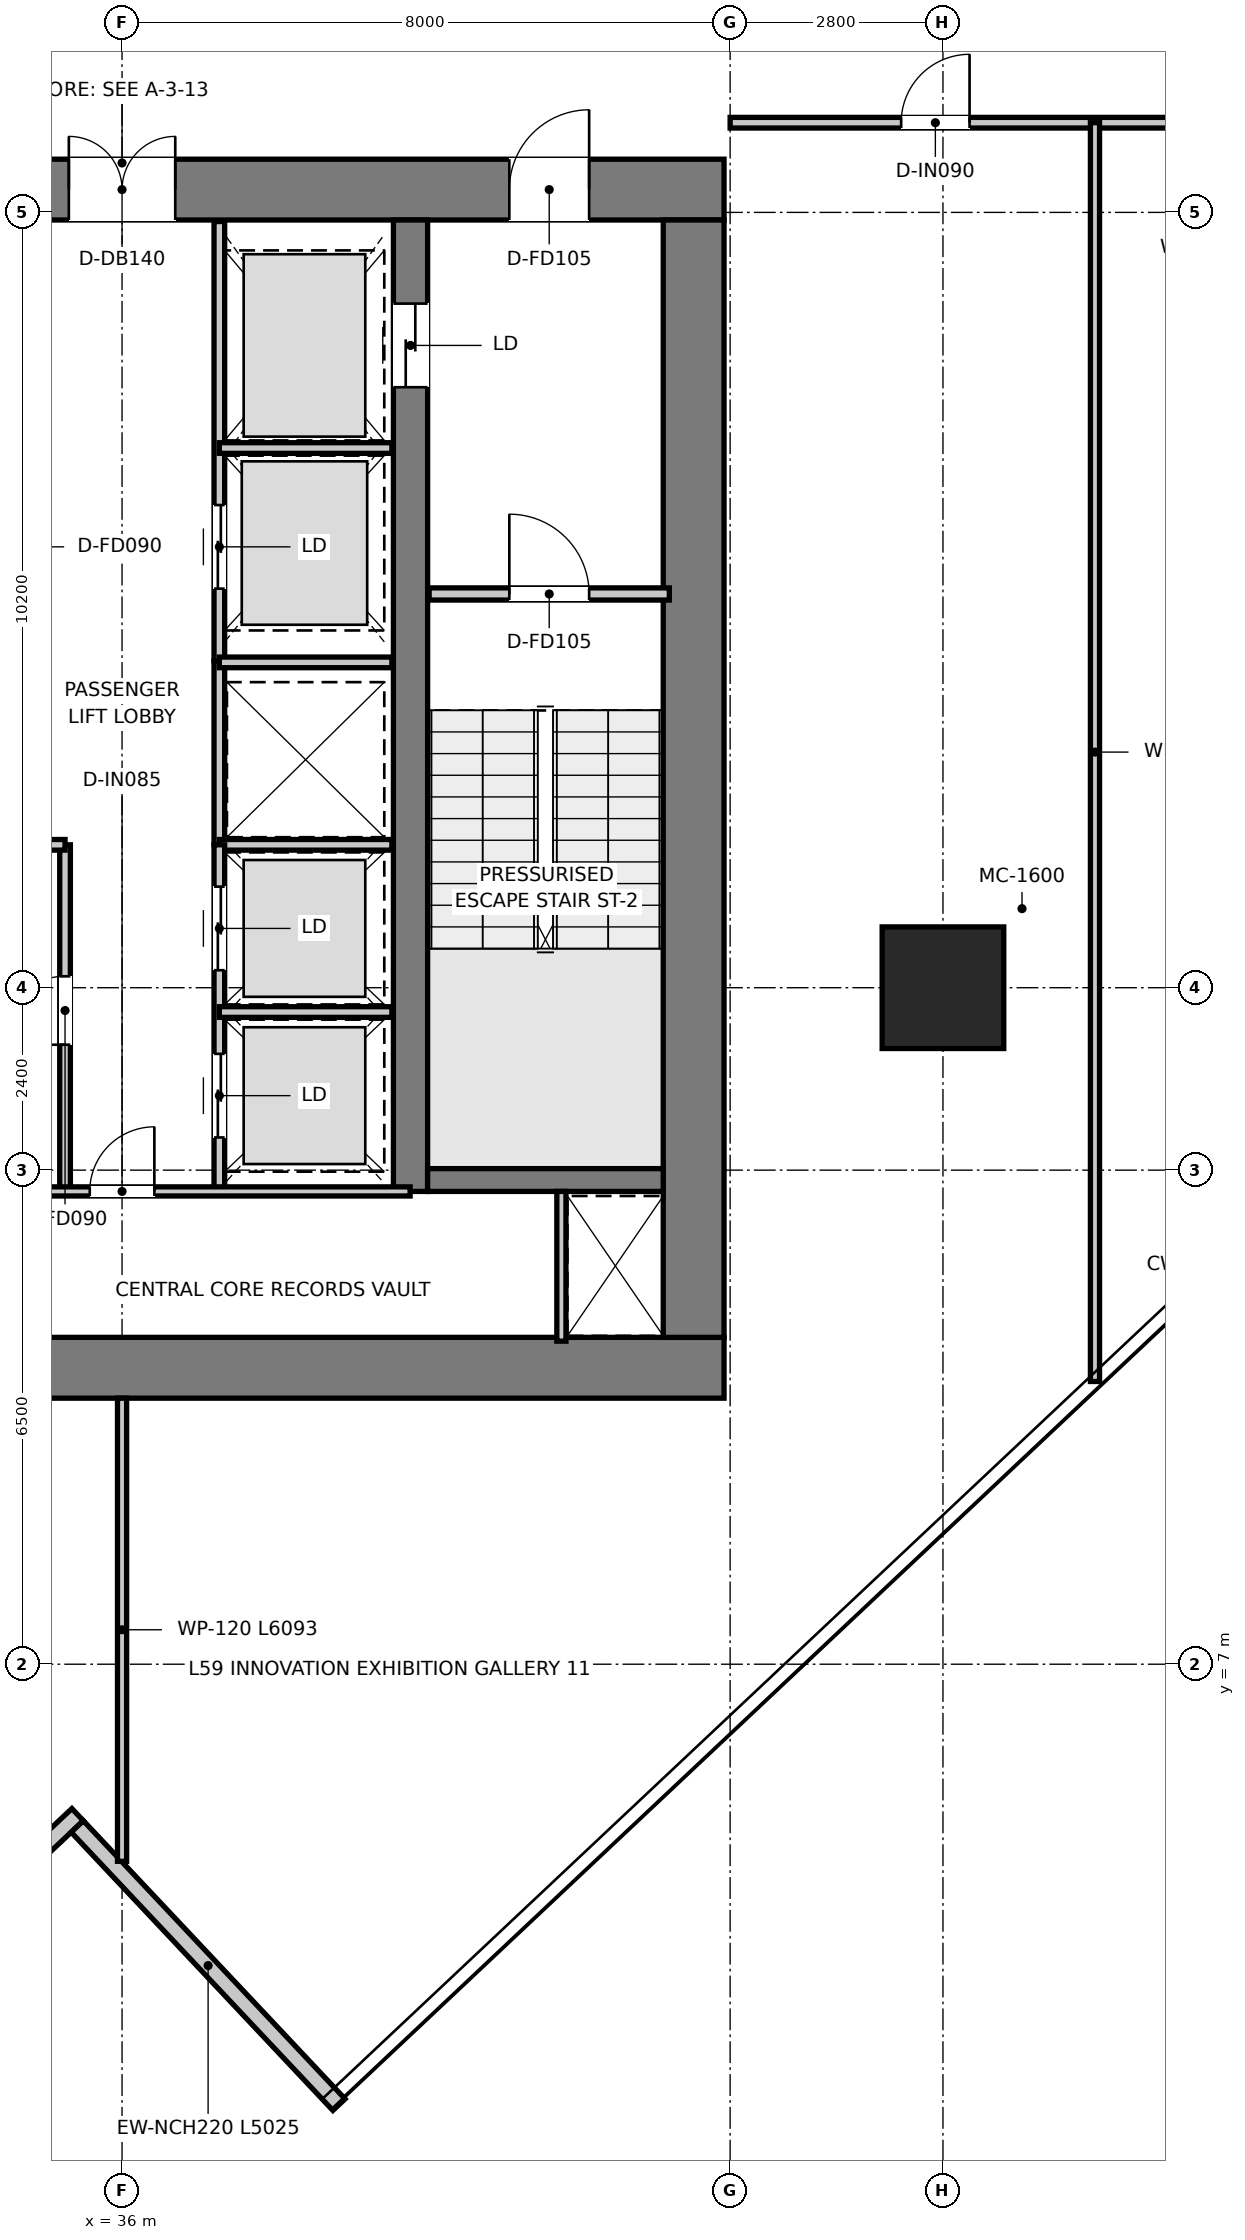
"""IFC4 building model, lengths in metres.
Left out: names, types, materials, properties, quantities, classifications, styles, units other than length and angle.
Written with IfcOpenShell. Run it as: python <this file> out.ifc"""

import sys

from ifc_helpers import new_model, si_unit, direction, frame, frame_2d, origin, origin_2d, place, context, subcontext, project, spatial, rectangle, extrude, source, transform, mapped, element, fill, save


model = new_model("IFC4")
c1 = context("Model", 3, precision=1e-05, world=origin(), true_north=direction((0.0, 1.0)))
c2 = subcontext(c1, "Body", "Model", "MODEL_VIEW")
j1 = project(units=[si_unit("LENGTHUNIT", "METRE"), si_unit("PLANEANGLEUNIT", "RADIAN")], contexts=[c1])
p1 = place(None, origin())
s1 = spatial("IfcSite", under=j1, at=p1, CompositionType="ELEMENT")
p2 = place(p1, origin())
s2 = spatial("IfcBuilding", under=s1, at=p2, CompositionType="ELEMENT")
p3 = place(p2, frame((0.0, 0.0, 242.85)))
s3 = spatial("IfcBuildingStorey", under=s2, at=p3, CompositionType="ELEMENT", Elevation=242.85)
p4 = place(p3, frame((28.08, 10.9, 0.0), z_axis=(0.0, 0.0, 1.0), x_axis=(1.0, 0.0, 0.0)))
e1 = element("IfcWall", 1, at=p4, inside=s3, PredefinedType="SHEAR", context=c2, shape_type="SweptSolid", body=[
    extrude(rectangle(XDim=15.84, YDim=0.8, at=frame_2d((7.92, 0.0))), origin(), (0.0, 0.0, 1.0), 3.95),
])
p5 = place(p3, frame((28.08, 26.4, 0.0), z_axis=(0.0, 0.0, 1.0), x_axis=(1.0, 0.0, 0.0)))
e2 = element("IfcWall", 2, at=p5, inside=s3, PredefinedType="SHEAR", context=c2, shape_type="SweptSolid", body=[
    extrude(rectangle(XDim=15.84, YDim=0.8, at=frame_2d((7.92, 0.0))), origin(), (0.0, 0.0, 1.0), 3.95),
])
p6 = place(p5, frame((7.22, 0.0, 0.0)))
e3 = element("IfcOpeningElement", 3, at=p6, cuts=e2, PredefinedType="OPENING", context=c2, shape_type="SweptSolid", body=[
    extrude(rectangle(XDim=1.4, YDim=2.2, at=frame_2d((0.7, 1.1))), frame((0.0, 0.41, 0.0), z_axis=(0.0, -1.0, 0.0), x_axis=(1.0, 0.0, 0.0)), (0.0, 0.0, 1.0), 0.82),
])
p7 = place(p5, frame((1.775, 0.0, 0.0)))
e4 = element("IfcOpeningElement", 4, at=p7, cuts=e2, PredefinedType="OPENING", context=c2, shape_type="SweptSolid", body=[
    extrude(rectangle(XDim=1.05, YDim=2.1, at=frame_2d((0.525, 1.05))), frame((0.0, 0.41, 0.0), z_axis=(0.0, -1.0, 0.0), x_axis=(1.0, 0.0, 0.0)), (0.0, 0.0, 1.0), 0.82),
])
p8 = place(p5, frame((13.015, 0.0, 0.0)))
e5 = element("IfcOpeningElement", 5, at=p8, cuts=e2, PredefinedType="OPENING", context=c2, shape_type="SweptSolid", body=[
    extrude(rectangle(XDim=1.05, YDim=2.1, at=frame_2d((0.525, 1.05))), frame((0.0, 0.41, 0.0), z_axis=(0.0, -1.0, 0.0), x_axis=(1.0, 0.0, 0.0)), (0.0, 0.0, 1.0), 0.82),
])
p9 = place(p3, frame((43.52, 11.3, 0.0), z_axis=(0.0, 0.0, 1.0), x_axis=(0.0, 1.0, 0.0)))
e6 = element("IfcWall", 6, at=p9, inside=s3, PredefinedType="SHEAR", context=c2, shape_type="SweptSolid", body=[
    extrude(rectangle(XDim=14.7, YDim=0.8, at=frame_2d((7.35, 0.0))), origin(), (0.0, 0.0, 1.0), 3.95),
])
p10 = place(p3, frame((39.795, 13.22, 0.0), z_axis=(0.0, 0.0, 1.0), x_axis=(0.0, 1.0, 0.0)))
e7 = element("IfcWall", 7, at=p10, inside=s3, PredefinedType="SHEAR", context=c2, shape_type="SweptSolid", body=[
    extrude(rectangle(XDim=12.78, YDim=0.45, at=frame_2d((6.39, 0.0))), origin(), (0.0, 0.0, 1.0), 3.95),
])
p11 = place(p10, frame((10.58, 0.0, 0.0)))
e8 = element("IfcOpeningElement", 8, at=p11, cuts=e7, PredefinedType="OPENING", context=c2, shape_type="SweptSolid", body=[
    extrude(rectangle(XDim=1.1, YDim=2.15, at=frame_2d((0.55, 1.075))), frame((0.0, 0.235, 0.0), z_axis=(0.0, -1.0, 0.0), x_axis=(1.0, 0.0, 0.0)), (0.0, 0.0, 1.0), 0.47),
])
p12 = place(p3, frame((40.02, 13.37, 0.0), z_axis=(0.0, 0.0, 1.0), x_axis=(1.0, 0.0, 0.0)))
e9 = element("IfcWall", 9, at=p12, inside=s3, PredefinedType="SHEAR", context=c2, shape_type="SweptSolid", body=[
    extrude(rectangle(XDim=3.1, YDim=0.3, at=frame_2d((1.55, 0.0))), origin(), (0.0, 0.0, 1.0), 3.95),
])
m1 = source(origin(), c2, "Body", "SweptSolid", [
    extrude(rectangle(XDim=1.6, YDim=1.6, at=origin_2d()), origin(), (0.0, 0.0, 1.0), 3.95),
])
p13 = place(p3, frame((46.8, 15.9, 0.0), z_axis=(0.0, 0.0, 1.0), x_axis=(1.0, 0.0, 0.0)))
e10 = element("IfcColumn", 10, at=p13, inside=s3, PredefinedType="USERDEFINED", context=c2, shape_type="MappedRepresentation", body=[
    mapped(m1, transform((0.0, 0.0, 0.0), x_axis=(1.0, 0.0, 0.0), y_axis=(0.0, 1.0, 0.0), z_axis=(0.0, 0.0, 1.0), scale=1.0)),
])
p14 = place(p3, frame((31.595, 1.427, 0.0), z_axis=(0.0, 0.0, 1.0), x_axis=(0.728374884992, 0.685178828418, 0.0)))
e11 = element("IfcWall", 11, at=p14, inside=s3, PredefinedType="ELEMENTEDWALL", context=c2, shape_type="SweptSolid", body=[
    extrude(rectangle(XDim=5.245, YDim=0.22, at=frame_2d((2.623, 0.0))), origin(), (0.0, 0.0, 1.0), 3.67),
])
p15 = place(p3, frame((35.411, 4.865, 0.0), z_axis=(0.0, 0.0, 1.0), x_axis=(0.685205552999, -0.728349744381, 0.0)))
e12 = element("IfcWall", 12, at=p15, inside=s3, PredefinedType="ELEMENTEDWALL", context=c2, shape_type="SweptSolid", body=[
    extrude(rectangle(XDim=5.025, YDim=0.22, at=frame_2d((2.512, 0.0))), origin(), (0.0, 0.0, 1.0), 3.67),
])
p16 = place(p3, frame((40.04, 21.08, 0.0), z_axis=(0.0, 0.0, 1.0), x_axis=(1.0, 0.0, 0.0)))
e13 = element("IfcWall", 13, at=p16, inside=s3, PredefinedType="PARTITIONING", context=c2, shape_type="SweptSolid", body=[
    extrude(rectangle(XDim=3.16, YDim=0.16, at=frame_2d((1.58, 0.0))), origin(), (0.0, 0.0, 1.0), 3.67),
])
p17 = place(p16, frame((1.055, 0.0, 0.0)))
e14 = element("IfcOpeningElement", 14, at=p17, cuts=e13, PredefinedType="OPENING", context=c2, shape_type="SweptSolid", body=[
    extrude(rectangle(XDim=1.05, YDim=2.1, at=frame_2d((0.525, 1.05))), frame((0.0, 0.09, 0.0), z_axis=(0.0, -1.0, 0.0), x_axis=(1.0, 0.0, 0.0)), (0.0, 0.0, 1.0), 0.18),
])
p18 = place(p3, frame((37.28, 20.2, 0.0), z_axis=(0.0, 0.0, 1.0), x_axis=(0.0, 1.0, 0.0)))
e15 = element("IfcWall", 15, at=p18, inside=s3, PredefinedType="PARTITIONING", context=c2, shape_type="SweptSolid", body=[
    extrude(rectangle(XDim=5.78, YDim=0.14, at=frame_2d((2.89, 0.0))), origin(), (0.0, 0.0, 1.0), 2.82),
])
p19 = place(p18, frame((0.95, 0.0, 0.0)))
e16 = element("IfcOpeningElement", 16, at=p19, cuts=e15, PredefinedType="OPENING", context=c2, shape_type="SweptSolid", body=[
    extrude(rectangle(XDim=1.1, YDim=2.15, at=frame_2d((0.55, 1.075))), frame((0.0, 0.08, 0.0), z_axis=(0.0, -1.0, 0.0), x_axis=(1.0, 0.0, 0.0)), (0.0, 0.0, 1.0), 0.16),
])
p20 = place(p3, frame((37.28, 23.0, 0.0), z_axis=(0.0, 0.0, 1.0), x_axis=(1.0, 0.0, 0.0)))
e17 = element("IfcWall", 17, at=p20, inside=s3, PredefinedType="PARTITIONING", context=c2, shape_type="SweptSolid", body=[
    extrude(rectangle(XDim=2.27, YDim=0.14, at=frame_2d((1.135, 0.0))), origin(), (0.0, 0.0, 1.0), 2.82),
])
p21 = place(p3, frame((37.28, 17.78, 0.0), z_axis=(0.0, 0.0, 1.0), x_axis=(0.0, 1.0, 0.0)))
e18 = element("IfcWall", 18, at=p21, inside=s3, PredefinedType="PARTITIONING", context=c2, shape_type="SweptSolid", body=[
    extrude(rectangle(XDim=2.42, YDim=0.14, at=frame_2d((1.21, 0.0))), origin(), (0.0, 0.0, 1.0), 3.67),
])
for number, where, z_axis, x_axis in (
    (19, (37.28, 17.78, 0.0), (0.0, 0.0, 1.0), (1.0, 0.0, 0.0)),
    (20, (37.28, 20.18, 0.0), (0.0, 0.0, 1.0), (1.0, 0.0, 0.0)),
):
    element("IfcWall", number, at=place(p3, frame(where, z_axis=z_axis, x_axis=x_axis)), inside=s3, PredefinedType="PARTITIONING", context=c2, shape_type="SweptSolid", body=[
        extrude(rectangle(XDim=2.27, YDim=0.14, at=frame_2d((1.135, 0.0))), origin(), (0.0, 0.0, 1.0), 3.67),
    ])
p22 = place(p3, frame((35.25, 13.22, 0.0), z_axis=(0.0, 0.0, 1.0), x_axis=(0.0, 1.0, 0.0)))
e21 = element("IfcWall", 21, at=p22, inside=s3, PredefinedType="PARTITIONING", context=c2, shape_type="SweptSolid", body=[
    extrude(rectangle(XDim=4.56, YDim=0.14, at=frame_2d((2.28, 0.0))), origin(), (0.0, 0.0, 1.0), 3.67),
])
p23 = place(p22, frame((1.93, 0.0, 0.0)))
e22 = element("IfcOpeningElement", 22, at=p23, cuts=e21, PredefinedType="OPENING", context=c2, shape_type="SweptSolid", body=[
    extrude(rectangle(XDim=0.9, YDim=2.1, at=frame_2d((0.45, 1.05))), frame((0.0, 0.08, 0.0), z_axis=(0.0, -1.0, 0.0), x_axis=(1.0, 0.0, 0.0)), (0.0, 0.0, 1.0), 0.16),
])
p24 = place(p3, frame((34.72, 17.78, 0.0), z_axis=(0.0, 0.0, 1.0), x_axis=(1.0, 0.0, 0.0)))
e23 = element("IfcWall", 23, at=p24, inside=s3, PredefinedType="PARTITIONING", context=c2, shape_type="SweptSolid", body=[
    extrude(rectangle(XDim=0.53, YDim=0.14, at=frame_2d((0.265, 0.0))), origin(), (0.0, 0.0, 1.0), 3.67),
])
p25 = place(p3, frame((37.28, 13.22, 0.0), z_axis=(0.0, 0.0, 1.0), x_axis=(0.0, 1.0, 0.0)))
e24 = element("IfcWall", 24, at=p25, inside=s3, PredefinedType="PARTITIONING", context=c2, shape_type="SweptSolid", body=[
    extrude(rectangle(XDim=4.56, YDim=0.14, at=frame_2d((2.28, 0.0))), origin(), (0.0, 0.0, 1.0), 3.67),
])
p26 = place(p25, frame((0.71, 0.0, 0.0)))
e25 = element("IfcOpeningElement", 25, at=p26, cuts=e24, PredefinedType="OPENING", context=c2, shape_type="SweptSolid", body=[
    extrude(rectangle(XDim=1.1, YDim=2.15, at=frame_2d((0.55, 1.075))), frame((0.0, 0.08, 0.0), z_axis=(0.0, -1.0, 0.0), x_axis=(1.0, 0.0, 0.0)), (0.0, 0.0, 1.0), 0.16),
])
p27 = place(p25, frame((2.91, 0.0, 0.0)))
e26 = element("IfcOpeningElement", 26, at=p27, cuts=e24, PredefinedType="OPENING", context=c2, shape_type="SweptSolid", body=[
    extrude(rectangle(XDim=1.1, YDim=2.15, at=frame_2d((0.55, 1.075))), frame((0.0, 0.08, 0.0), z_axis=(0.0, -1.0, 0.0), x_axis=(1.0, 0.0, 0.0)), (0.0, 0.0, 1.0), 0.16),
])
p28 = place(p3, frame((37.28, 15.58, 0.0), z_axis=(0.0, 0.0, 1.0), x_axis=(1.0, 0.0, 0.0)))
e27 = element("IfcWall", 27, at=p28, inside=s3, PredefinedType="PARTITIONING", context=c2, shape_type="SweptSolid", body=[
    extrude(rectangle(XDim=2.27, YDim=0.14, at=frame_2d((1.135, 0.0))), origin(), (0.0, 0.0, 1.0), 3.67),
])
p29 = place(p3, frame((41.78, 11.25, 0.0), z_axis=(0.0, 0.0, 1.0), x_axis=(0.0, 1.0, 0.0)))
e28 = element("IfcWall", 28, at=p29, inside=s3, PredefinedType="PARTITIONING", context=c2, shape_type="SweptSolid", body=[
    extrude(rectangle(XDim=1.97, YDim=0.12, at=frame_2d((0.985, 0.0))), origin(), (0.0, 0.0, 1.0), 3.67),
])
p30 = place(p3, frame((32.21, 13.22, 0.0), z_axis=(0.0, 0.0, 1.0), x_axis=(1.0, 0.0, 0.0)))
e29 = element("IfcWall", 29, at=p30, inside=s3, PredefinedType="PARTITIONING", context=c2, shape_type="SweptSolid", body=[
    extrude(rectangle(XDim=7.58, YDim=0.12, at=frame_2d((3.79, 0.0))), origin(), (0.0, 0.0, 1.0), 3.67),
])
p31 = place(p30, frame((3.365, 0.0, 0.0)))
e30 = element("IfcOpeningElement", 30, at=p31, cuts=e29, PredefinedType="OPENING", context=c2, shape_type="SweptSolid", body=[
    extrude(rectangle(XDim=0.85, YDim=2.1, at=frame_2d((0.425, 1.05))), frame((0.0, 0.07, 0.0), z_axis=(0.0, -1.0, 0.0), x_axis=(1.0, 0.0, 0.0)), (0.0, 0.0, 1.0), 0.14),
])
p32 = place(p3, frame((44.0, 27.28, 0.0), z_axis=(0.0, 0.0, 1.0), x_axis=(1.0, 0.0, 0.0)))
e31 = element("IfcWall", 31, at=p32, inside=s3, PredefinedType="PARTITIONING", context=c2, shape_type="SweptSolid", body=[
    extrude(rectangle(XDim=14.91, YDim=0.14, at=frame_2d((7.455, 0.0))), origin(), (0.0, 0.0, 1.0), 3.03),
])
p33 = place(p32, frame((2.25, 0.0, 0.0)))
e32 = element("IfcOpeningElement", 32, at=p33, cuts=e31, PredefinedType="OPENING", context=c2, shape_type="SweptSolid", body=[
    extrude(rectangle(XDim=0.9, YDim=2.1, at=frame_2d((0.45, 1.05))), frame((0.0, 0.08, 0.0), z_axis=(0.0, -1.0, 0.0), x_axis=(1.0, 0.0, 0.0)), (0.0, 0.0, 1.0), 0.16),
])
p34 = place(p32, frame((10.17, 0.0, 0.0)))
e33 = element("IfcOpeningElement", 33, at=p34, cuts=e31, PredefinedType="OPENING", context=c2, shape_type="SweptSolid", body=[
    extrude(rectangle(XDim=0.9, YDim=2.1, at=frame_2d((0.45, 1.05))), frame((0.0, 0.08, 0.0), z_axis=(0.0, -1.0, 0.0), x_axis=(1.0, 0.0, 0.0)), (0.0, 0.0, 1.0), 0.16),
])
p35 = place(p3, frame((36.0, 4.407, 0.0), z_axis=(0.0, 0.0, 1.0), x_axis=(0.0, 1.0, 0.0)))
e34 = element("IfcWall", 34, at=p35, inside=s3, PredefinedType="PARTITIONING", context=c2, shape_type="SweptSolid", body=[
    extrude(rectangle(XDim=6.093, YDim=0.12, at=frame_2d((3.047, 0.0))), origin(), (0.0, 0.0, 1.0), 3.67),
])
p36 = place(p3, frame((48.8, 10.719, 0.0), z_axis=(0.0, 0.0, 1.0), x_axis=(0.0, 1.0, 0.0)))
e35 = element("IfcWall", 35, at=p36, inside=s3, PredefinedType="PARTITIONING", context=c2, shape_type="SweptSolid", body=[
    extrude(rectangle(XDim=16.561, YDim=0.12, at=frame_2d((8.28, 0.0))), origin(), (0.0, 0.0, 1.0), 3.18),
])
p37 = place(p17, origin())
e36 = element("IfcDoor", 36, at=p37, inside=s3, OperationType="SINGLE_SWING_LEFT", PredefinedType="DOOR", context=c2, shape_type="SweptSolid", body=[
    extrude(rectangle(XDim=1.05, YDim=2.1, at=frame_2d((0.525, 1.05))), frame((0.0, 0.025, 0.0), z_axis=(0.0, -1.0, 0.0), x_axis=(1.0, 0.0, 0.0)), (0.0, 0.0, 1.0), 0.05),
])
fill(e14, e36)
p38 = place(p6, origin())
e37 = element("IfcDoor", 37, at=p38, inside=s3, OperationType="DOUBLE_DOOR_SINGLE_SWING", PredefinedType="DOOR", context=c2, shape_type="SweptSolid", body=[
    extrude(rectangle(XDim=1.4, YDim=2.2, at=frame_2d((0.7, 1.1))), frame((0.0, 0.025, 0.0), z_axis=(0.0, -1.0, 0.0), x_axis=(1.0, 0.0, 0.0)), (0.0, 0.0, 1.0), 0.05),
])
fill(e3, e37)
p39 = place(p8, origin())
e38 = element("IfcDoor", 38, at=p39, inside=s3, OperationType="SINGLE_SWING_RIGHT", PredefinedType="DOOR", context=c2, shape_type="SweptSolid", body=[
    extrude(rectangle(XDim=1.05, YDim=2.1, at=frame_2d((0.525, 1.05))), frame((0.0, 0.025, 0.0), z_axis=(0.0, -1.0, 0.0), x_axis=(1.0, 0.0, 0.0)), (0.0, 0.0, 1.0), 0.05),
])
fill(e5, e38)
p40 = place(p11, origin())
e39 = element("IfcDoor", 39, at=p40, inside=s3, OperationType="DOUBLE_DOOR_SLIDING", PredefinedType="DOOR", context=c2, shape_type="SweptSolid", body=[
    extrude(rectangle(XDim=1.1, YDim=2.15, at=frame_2d((0.55, 1.075))), frame((0.0, 0.025, 0.0), z_axis=(0.0, -1.0, 0.0), x_axis=(1.0, 0.0, 0.0)), (0.0, 0.0, 1.0), 0.05),
])
fill(e8, e39)
p41 = place(p19, origin())
e40 = element("IfcDoor", 40, at=p41, inside=s3, OperationType="DOUBLE_DOOR_SLIDING", PredefinedType="DOOR", context=c2, shape_type="SweptSolid", body=[
    extrude(rectangle(XDim=1.1, YDim=2.15, at=frame_2d((0.55, 1.075))), frame((0.0, 0.025, 0.0), z_axis=(0.0, -1.0, 0.0), x_axis=(1.0, 0.0, 0.0)), (0.0, 0.0, 1.0), 0.05),
])
fill(e16, e40)
p42 = place(p23, origin())
e41 = element("IfcDoor", 41, at=p42, inside=s3, OperationType="SINGLE_SWING_LEFT", PredefinedType="DOOR", context=c2, shape_type="SweptSolid", body=[
    extrude(rectangle(XDim=0.9, YDim=2.1, at=frame_2d((0.45, 1.05))), frame((0.0, 0.025, 0.0), z_axis=(0.0, -1.0, 0.0), x_axis=(1.0, 0.0, 0.0)), (0.0, 0.0, 1.0), 0.05),
])
fill(e22, e41)
p43 = place(p26, origin())
e42 = element("IfcDoor", 42, at=p43, inside=s3, OperationType="DOUBLE_DOOR_SLIDING", PredefinedType="DOOR", context=c2, shape_type="SweptSolid", body=[
    extrude(rectangle(XDim=1.1, YDim=2.15, at=frame_2d((0.55, 1.075))), frame((0.0, 0.025, 0.0), z_axis=(0.0, -1.0, 0.0), x_axis=(1.0, 0.0, 0.0)), (0.0, 0.0, 1.0), 0.05),
])
fill(e25, e42)
p44 = place(p27, origin())
e43 = element("IfcDoor", 43, at=p44, inside=s3, OperationType="DOUBLE_DOOR_SLIDING", PredefinedType="DOOR", context=c2, shape_type="SweptSolid", body=[
    extrude(rectangle(XDim=1.1, YDim=2.15, at=frame_2d((0.55, 1.075))), frame((0.0, 0.025, 0.0), z_axis=(0.0, -1.0, 0.0), x_axis=(1.0, 0.0, 0.0)), (0.0, 0.0, 1.0), 0.05),
])
fill(e26, e43)
p45 = place(p31, origin())
e44 = element("IfcDoor", 44, at=p45, inside=s3, OperationType="SINGLE_SWING_RIGHT", PredefinedType="DOOR", context=c2, shape_type="SweptSolid", body=[
    extrude(rectangle(XDim=0.85, YDim=2.1, at=frame_2d((0.425, 1.05))), frame((0.0, 0.025, 0.0), z_axis=(0.0, -1.0, 0.0), x_axis=(1.0, 0.0, 0.0)), (0.0, 0.0, 1.0), 0.05),
])
fill(e30, e44)
p46 = place(p33, origin())
e45 = element("IfcDoor", 45, at=p46, inside=s3, OperationType="SINGLE_SWING_RIGHT", PredefinedType="DOOR", context=c2, shape_type="SweptSolid", body=[
    extrude(rectangle(XDim=0.9, YDim=2.1, at=frame_2d((0.45, 1.05))), frame((0.0, 0.025, 0.0), z_axis=(0.0, -1.0, 0.0), x_axis=(1.0, 0.0, 0.0)), (0.0, 0.0, 1.0), 0.05),
])
fill(e32, e45)
save(model, sys.argv[1])
